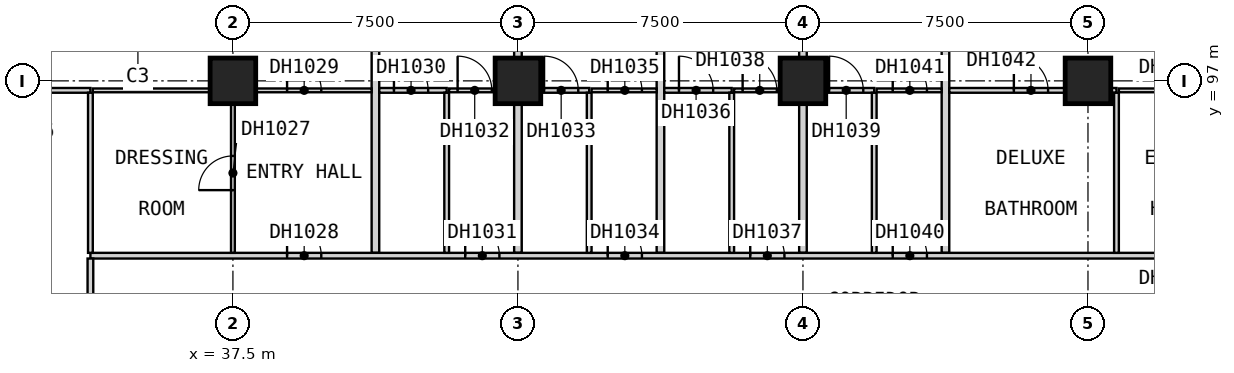
"""IFC4 building model, lengths in metres.
Left out: names, types, materials, properties, quantities, classifications, styles, units other than length and angle.
Written with IfcOpenShell. Run it as: python <this file> out.ifc"""

import sys

from ifc_helpers import new_model, si_unit, direction, frame, frame_2d, origin, origin_2d, place, context, subcontext, project, spatial, rectangle, extrude, element, fill, save


model = new_model("IFC4")
c1 = context("Model", 3, precision=1e-05, world=origin(), true_north=direction((0.0, 1.0)))
c2 = subcontext(c1, "Body", "Model", "MODEL_VIEW")
j1 = project(units=[si_unit("LENGTHUNIT", "METRE"), si_unit("PLANEANGLEUNIT", "RADIAN")], contexts=[c1])
p1 = place(None, origin())
s1 = spatial("IfcSite", under=j1, at=p1, CompositionType="ELEMENT")
p2 = place(p1, origin())
s2 = spatial("IfcBuilding", under=s1, at=p2, CompositionType="ELEMENT")
p3 = place(p2, frame((0.0, 0.0, 48.4)))
s3 = spatial("IfcBuildingStorey", under=s2, at=p3, CompositionType="ELEMENT", Elevation=48.4)
for number, where, z_axis, x_axis in (
    (1, (37.5, 97.0, 0.0), (0.0, 0.0, 1.0), (1.0, 0.0, 0.0)),
    (2, (45.0, 97.0, 0.0), (0.0, 0.0, 1.0), (1.0, 0.0, 0.0)),
    (3, (52.5, 97.0, 0.0), (0.0, 0.0, 1.0), (1.0, 0.0, 0.0)),
    (4, (60.0, 97.0, 0.0), (0.0, 0.0, 1.0), (1.0, 0.0, 0.0)),
):
    element("IfcColumn", number, at=place(p3, frame(where, z_axis=z_axis, x_axis=x_axis)), inside=s3, PredefinedType="COLUMN", context=c2, shape_type="SweptSolid", body=[
        extrude(rectangle(XDim=1.2, YDim=1.2, at=origin_2d()), origin(), (0.0, 0.0, 1.0), 3.6),
    ])
p4 = place(p3, frame((41.25, 92.475, 0.0), z_axis=(0.0, 0.0, 1.0), x_axis=(0.0, 1.0, 0.0)))
e5 = element("IfcWall", 5, at=p4, inside=s3, PredefinedType="PARTITIONING", context=c2, shape_type="SweptSolid", body=[
    extrude(rectangle(XDim=11.715, YDim=0.2, at=frame_2d((5.857, 0.0))), origin(), (0.0, 0.0, 1.0), 3.35),
])
p5 = place(p3, frame((45.0, 92.475, 0.0), z_axis=(0.0, 0.0, 1.0), x_axis=(0.0, 1.0, 0.0)))
e6 = element("IfcWall", 6, at=p5, inside=s3, PredefinedType="PARTITIONING", context=c2, shape_type="SweptSolid", body=[
    extrude(rectangle(XDim=12.525, YDim=0.2, at=frame_2d((6.262, 0.0))), origin(), (0.0, 0.0, 1.0), 3.35),
])
p6 = place(p3, frame((48.75, 92.475, 0.0), z_axis=(0.0, 0.0, 1.0), x_axis=(0.0, 1.0, 0.0)))
e7 = element("IfcWall", 7, at=p6, inside=s3, PredefinedType="PARTITIONING", context=c2, shape_type="SweptSolid", body=[
    extrude(rectangle(XDim=11.715, YDim=0.2, at=frame_2d((5.857, 0.0))), origin(), (0.0, 0.0, 1.0), 3.35),
])
p7 = place(p3, frame((52.5, 92.475, 0.0), z_axis=(0.0, 0.0, 1.0), x_axis=(0.0, 1.0, 0.0)))
e8 = element("IfcWall", 8, at=p7, inside=s3, PredefinedType="PARTITIONING", context=c2, shape_type="SweptSolid", body=[
    extrude(rectangle(XDim=12.525, YDim=0.2, at=frame_2d((6.262, 0.0))), origin(), (0.0, 0.0, 1.0), 3.35),
])
p8 = place(p3, frame((56.25, 92.475, 0.0), z_axis=(0.0, 0.0, 1.0), x_axis=(0.0, 1.0, 0.0)))
e9 = element("IfcWall", 9, at=p8, inside=s3, PredefinedType="PARTITIONING", context=c2, shape_type="SweptSolid", body=[
    extrude(rectangle(XDim=11.715, YDim=0.2, at=frame_2d((5.857, 0.0))), origin(), (0.0, 0.0, 1.0), 3.35),
])
p9 = place(p3, frame((33.75, 92.4, 0.0), z_axis=(0.0, 0.0, 1.0), x_axis=(1.0, 0.0, 0.0)))
e10 = element("IfcWall", 10, at=p9, inside=s3, PredefinedType="PARTITIONING", context=c2, shape_type="SweptSolid", body=[
    extrude(rectangle(XDim=43.65, YDim=0.15, at=frame_2d((21.825, 0.0))), origin(), (0.0, 0.0, 1.0), 3.35),
])
p10 = place(p9, frame((5.175, 0.0, 0.0)))
e11 = element("IfcOpeningElement", 11, at=p10, cuts=e10, PredefinedType="OPENING", context=c2, shape_type="SweptSolid", body=[
    extrude(rectangle(XDim=0.9, YDim=2.1, at=frame_2d((0.45, 1.05))), frame((0.0, 0.085, 0.0), z_axis=(0.0, -1.0, 0.0), x_axis=(1.0, 0.0, 0.0)), (0.0, 0.0, 1.0), 0.17),
])
p11 = place(p9, frame((9.863, 0.0, 0.0)))
e12 = element("IfcOpeningElement", 12, at=p11, cuts=e10, PredefinedType="OPENING", context=c2, shape_type="SweptSolid", body=[
    extrude(rectangle(XDim=0.9, YDim=2.1, at=frame_2d((0.45, 1.05))), frame((0.0, 0.085, 0.0), z_axis=(0.0, -1.0, 0.0), x_axis=(1.0, 0.0, 0.0)), (0.0, 0.0, 1.0), 0.17),
])
p12 = place(p9, frame((13.613, 0.0, 0.0)))
e13 = element("IfcOpeningElement", 13, at=p12, cuts=e10, PredefinedType="OPENING", context=c2, shape_type="SweptSolid", body=[
    extrude(rectangle(XDim=0.9, YDim=2.1, at=frame_2d((0.45, 1.05))), frame((0.0, 0.085, 0.0), z_axis=(0.0, -1.0, 0.0), x_axis=(1.0, 0.0, 0.0)), (0.0, 0.0, 1.0), 0.17),
])
p13 = place(p9, frame((17.363, 0.0, 0.0)))
e14 = element("IfcOpeningElement", 14, at=p13, cuts=e10, PredefinedType="OPENING", context=c2, shape_type="SweptSolid", body=[
    extrude(rectangle(XDim=0.9, YDim=2.1, at=frame_2d((0.45, 1.05))), frame((0.0, 0.085, 0.0), z_axis=(0.0, -1.0, 0.0), x_axis=(1.0, 0.0, 0.0)), (0.0, 0.0, 1.0), 0.17),
])
p14 = place(p9, frame((21.113, 0.0, 0.0)))
e15 = element("IfcOpeningElement", 15, at=p14, cuts=e10, PredefinedType="OPENING", context=c2, shape_type="SweptSolid", body=[
    extrude(rectangle(XDim=0.9, YDim=2.1, at=frame_2d((0.45, 1.05))), frame((0.0, 0.085, 0.0), z_axis=(0.0, -1.0, 0.0), x_axis=(1.0, 0.0, 0.0)), (0.0, 0.0, 1.0), 0.17),
])
p15 = place(p9, frame((28.05, 0.0, 0.0)))
e16 = element("IfcOpeningElement", 16, at=p15, cuts=e10, PredefinedType="OPENING", context=c2, shape_type="SweptSolid", body=[
    extrude(rectangle(XDim=0.9, YDim=2.1, at=frame_2d((0.45, 1.05))), frame((0.0, 0.085, 0.0), z_axis=(0.0, -1.0, 0.0), x_axis=(1.0, 0.0, 0.0)), (0.0, 0.0, 1.0), 0.17),
])
p16 = place(p9, frame((32.363, 0.0, 0.0)))
e17 = element("IfcOpeningElement", 17, at=p16, cuts=e10, PredefinedType="OPENING", context=c2, shape_type="SweptSolid", body=[
    extrude(rectangle(XDim=0.9, YDim=2.1, at=frame_2d((0.45, 1.05))), frame((0.0, 0.085, 0.0), z_axis=(0.0, -1.0, 0.0), x_axis=(1.0, 0.0, 0.0)), (0.0, 0.0, 1.0), 0.17),
])
p17 = place(p9, frame((39.3, 0.0, 0.0)))
e18 = element("IfcOpeningElement", 18, at=p17, cuts=e10, PredefinedType="OPENING", context=c2, shape_type="SweptSolid", body=[
    extrude(rectangle(XDim=0.9, YDim=2.1, at=frame_2d((0.45, 1.05))), frame((0.0, 0.085, 0.0), z_axis=(0.0, -1.0, 0.0), x_axis=(1.0, 0.0, 0.0)), (0.0, 0.0, 1.0), 0.17),
])
p18 = place(p9, frame((42.0, 0.0, 0.0)))
e19 = element("IfcOpeningElement", 19, at=p18, cuts=e10, PredefinedType="OPENING", context=c2, shape_type="SweptSolid", body=[
    extrude(rectangle(XDim=0.9, YDim=2.1, at=frame_2d((0.45, 1.05))), frame((0.0, 0.085, 0.0), z_axis=(0.0, -1.0, 0.0), x_axis=(1.0, 0.0, 0.0)), (0.0, 0.0, 1.0), 0.17),
])
p19 = place(p3, frame((33.75, 90.1, 0.0), z_axis=(0.0, 0.0, 1.0), x_axis=(0.0, 1.0, 0.0)))
e20 = element("IfcWall", 20, at=p19, inside=s3, PredefinedType="PARTITIONING", context=c2, shape_type="SweptSolid", body=[
    extrude(rectangle(XDim=2.225, YDim=0.15, at=frame_2d((1.112, 0.0))), origin(), (0.0, 0.0, 1.0), 3.35),
])
p20 = place(p3, frame((33.812, 96.75, 0.0), z_axis=(0.0, 0.0, 1.0), x_axis=(1.0, 0.0, 0.0)))
e21 = element("IfcWall", 21, at=p20, inside=s3, PredefinedType="PARTITIONING", context=c2, shape_type="SweptSolid", body=[
    extrude(rectangle(XDim=7.337, YDim=0.1, at=frame_2d((3.669, 0.0))), origin(), (0.0, 0.0, 1.0), 3.35),
])
p21 = place(p20, frame((5.113, 0.0, 0.0)))
e22 = element("IfcOpeningElement", 22, at=p21, cuts=e21, PredefinedType="OPENING", context=c2, shape_type="SweptSolid", body=[
    extrude(rectangle(XDim=0.9, YDim=2.1, at=frame_2d((0.45, 1.05))), frame((0.0, 0.06, 0.0), z_axis=(0.0, -1.0, 0.0), x_axis=(1.0, 0.0, 0.0)), (0.0, 0.0, 1.0), 0.12),
])
p22 = place(p3, frame((43.188, 96.75, 0.0), z_axis=(0.0, 0.0, 1.0), x_axis=(1.0, 0.0, 0.0)))
e23 = element("IfcWall", 23, at=p22, inside=s3, PredefinedType="PARTITIONING", context=c2, shape_type="SweptSolid", body=[
    extrude(rectangle(XDim=1.712, YDim=0.1, at=frame_2d((0.856, 0.0))), origin(), (0.0, 0.0, 1.0), 3.35),
])
p23 = place(p22, frame((0.225, 0.0, 0.0)))
e24 = element("IfcOpeningElement", 24, at=p23, cuts=e23, PredefinedType="OPENING", context=c2, shape_type="SweptSolid", body=[
    extrude(rectangle(XDim=0.9, YDim=2.1, at=frame_2d((0.45, 1.05))), frame((0.0, 0.06, 0.0), z_axis=(0.0, -1.0, 0.0), x_axis=(1.0, 0.0, 0.0)), (0.0, 0.0, 1.0), 0.12),
])
p24 = place(p3, frame((46.938, 96.75, 0.0), z_axis=(0.0, 0.0, 1.0), x_axis=(1.0, 0.0, 0.0)))
e25 = element("IfcWall", 25, at=p24, inside=s3, PredefinedType="PARTITIONING", context=c2, shape_type="SweptSolid", body=[
    extrude(rectangle(XDim=1.712, YDim=0.1, at=frame_2d((0.856, 0.0))), origin(), (0.0, 0.0, 1.0), 3.35),
])
p25 = place(p24, frame((0.425, 0.0, 0.0)))
e26 = element("IfcOpeningElement", 26, at=p25, cuts=e25, PredefinedType="OPENING", context=c2, shape_type="SweptSolid", body=[
    extrude(rectangle(XDim=0.9, YDim=2.1, at=frame_2d((0.45, 1.05))), frame((0.0, 0.06, 0.0), z_axis=(0.0, -1.0, 0.0), x_axis=(1.0, 0.0, 0.0)), (0.0, 0.0, 1.0), 0.12),
])
p26 = place(p3, frame((50.688, 96.75, 0.0), z_axis=(0.0, 0.0, 1.0), x_axis=(1.0, 0.0, 0.0)))
e27 = element("IfcWall", 27, at=p26, inside=s3, PredefinedType="PARTITIONING", context=c2, shape_type="SweptSolid", body=[
    extrude(rectangle(XDim=1.712, YDim=0.1, at=frame_2d((0.856, 0.0))), origin(), (0.0, 0.0, 1.0), 3.35),
])
p27 = place(p26, frame((0.225, 0.0, 0.0)))
e28 = element("IfcOpeningElement", 28, at=p27, cuts=e27, PredefinedType="OPENING", context=c2, shape_type="SweptSolid", body=[
    extrude(rectangle(XDim=0.9, YDim=2.1, at=frame_2d((0.45, 1.05))), frame((0.0, 0.06, 0.0), z_axis=(0.0, -1.0, 0.0), x_axis=(1.0, 0.0, 0.0)), (0.0, 0.0, 1.0), 0.12),
])
p28 = place(p3, frame((54.438, 96.75, 0.0), z_axis=(0.0, 0.0, 1.0), x_axis=(1.0, 0.0, 0.0)))
e29 = element("IfcWall", 29, at=p28, inside=s3, PredefinedType="PARTITIONING", context=c2, shape_type="SweptSolid", body=[
    extrude(rectangle(XDim=1.712, YDim=0.1, at=frame_2d((0.856, 0.0))), origin(), (0.0, 0.0, 1.0), 3.35),
])
p29 = place(p28, frame((0.425, 0.0, 0.0)))
e30 = element("IfcOpeningElement", 30, at=p29, cuts=e29, PredefinedType="OPENING", context=c2, shape_type="SweptSolid", body=[
    extrude(rectangle(XDim=0.9, YDim=2.1, at=frame_2d((0.45, 1.05))), frame((0.0, 0.06, 0.0), z_axis=(0.0, -1.0, 0.0), x_axis=(1.0, 0.0, 0.0)), (0.0, 0.0, 1.0), 0.12),
])
p30 = place(p3, frame((60.812, 96.75, 0.0), z_axis=(0.0, 0.0, 1.0), x_axis=(1.0, 0.0, 0.0)))
e31 = element("IfcWall", 31, at=p30, inside=s3, PredefinedType="PARTITIONING", context=c2, shape_type="SweptSolid", body=[
    extrude(rectangle(XDim=2.837, YDim=0.1, at=frame_2d((1.419, 0.0))), origin(), (0.0, 0.0, 1.0), 3.35),
])
p31 = place(p30, frame((0.988, 0.0, 0.0)))
e32 = element("IfcOpeningElement", 32, at=p31, cuts=e31, PredefinedType="OPENING", context=c2, shape_type="SweptSolid", body=[
    extrude(rectangle(XDim=0.9, YDim=2.1, at=frame_2d((0.45, 1.05))), frame((0.0, 0.06, 0.0), z_axis=(0.0, -1.0, 0.0), x_axis=(1.0, 0.0, 0.0)), (0.0, 0.0, 1.0), 0.12),
])
p32 = place(p3, frame((37.5, 92.475, 0.0), z_axis=(0.0, 0.0, 1.0), x_axis=(0.0, 1.0, 0.0)))
e33 = element("IfcWall", 33, at=p32, inside=s3, PredefinedType="PARTITIONING", context=c2, shape_type="SweptSolid", body=[
    extrude(rectangle(XDim=4.225, YDim=0.1, at=frame_2d((2.112, 0.0))), origin(), (0.0, 0.0, 1.0), 3.35),
])
p33 = place(p32, frame((1.65, 0.0, 0.0)))
e34 = element("IfcOpeningElement", 34, at=p33, cuts=e33, PredefinedType="OPENING", context=c2, shape_type="SweptSolid", body=[
    extrude(rectangle(XDim=0.9, YDim=2.1, at=frame_2d((0.45, 1.05))), frame((0.0, 0.06, 0.0), z_axis=(0.0, -1.0, 0.0), x_axis=(1.0, 0.0, 0.0)), (0.0, 0.0, 1.0), 0.12),
])
p34 = place(p3, frame((30.0, 96.75, 0.0), z_axis=(0.0, 0.0, 1.0), x_axis=(1.0, 0.0, 0.0)))
e35 = element("IfcWall", 35, at=p34, inside=s3, PredefinedType="PARTITIONING", context=c2, shape_type="SweptSolid", body=[
    extrude(rectangle(XDim=3.75, YDim=0.125, at=frame_2d((1.875, 0.0))), origin(), (0.0, 0.0, 1.0), 3.35),
])
p35 = place(p34, frame((1.425, 0.0, 0.0)))
e36 = element("IfcOpeningElement", 36, at=p35, cuts=e35, PredefinedType="OPENING", context=c2, shape_type="SweptSolid", body=[
    extrude(rectangle(XDim=0.9, YDim=2.1, at=frame_2d((0.45, 1.05))), frame((0.0, 0.073, 0.0), z_axis=(0.0, -1.0, 0.0), x_axis=(1.0, 0.0, 0.0)), (0.0, 0.0, 1.0), 0.145),
])
p36 = place(p3, frame((41.35, 96.75, 0.0), z_axis=(0.0, 0.0, 1.0), x_axis=(1.0, 0.0, 0.0)))
e37 = element("IfcWall", 37, at=p36, inside=s3, PredefinedType="PARTITIONING", context=c2, shape_type="SweptSolid", body=[
    extrude(rectangle(XDim=1.775, YDim=0.125, at=frame_2d((0.887, 0.0))), origin(), (0.0, 0.0, 1.0), 3.35),
])
p37 = place(p36, frame((0.387, 0.0, 0.0)))
e38 = element("IfcOpeningElement", 38, at=p37, cuts=e37, PredefinedType="OPENING", context=c2, shape_type="SweptSolid", body=[
    extrude(rectangle(XDim=0.9, YDim=2.1, at=frame_2d((0.45, 1.05))), frame((0.0, 0.073, 0.0), z_axis=(0.0, -1.0, 0.0), x_axis=(1.0, 0.0, 0.0)), (0.0, 0.0, 1.0), 0.145),
])
p38 = place(p3, frame((45.1, 96.75, 0.0), z_axis=(0.0, 0.0, 1.0), x_axis=(1.0, 0.0, 0.0)))
e39 = element("IfcWall", 39, at=p38, inside=s3, PredefinedType="PARTITIONING", context=c2, shape_type="SweptSolid", body=[
    extrude(rectangle(XDim=1.775, YDim=0.125, at=frame_2d((0.887, 0.0))), origin(), (0.0, 0.0, 1.0), 3.35),
])
p39 = place(p38, frame((0.587, 0.0, 0.0)))
e40 = element("IfcOpeningElement", 40, at=p39, cuts=e39, PredefinedType="OPENING", context=c2, shape_type="SweptSolid", body=[
    extrude(rectangle(XDim=0.9, YDim=2.1, at=frame_2d((0.45, 1.05))), frame((0.0, 0.073, 0.0), z_axis=(0.0, -1.0, 0.0), x_axis=(1.0, 0.0, 0.0)), (0.0, 0.0, 1.0), 0.145),
])
p40 = place(p3, frame((48.85, 96.75, 0.0), z_axis=(0.0, 0.0, 1.0), x_axis=(1.0, 0.0, 0.0)))
e41 = element("IfcWall", 41, at=p40, inside=s3, PredefinedType="PARTITIONING", context=c2, shape_type="SweptSolid", body=[
    extrude(rectangle(XDim=1.775, YDim=0.125, at=frame_2d((0.887, 0.0))), origin(), (0.0, 0.0, 1.0), 3.35),
])
p41 = place(p40, frame((0.387, 0.0, 0.0)))
e42 = element("IfcOpeningElement", 42, at=p41, cuts=e41, PredefinedType="OPENING", context=c2, shape_type="SweptSolid", body=[
    extrude(rectangle(XDim=0.9, YDim=2.1, at=frame_2d((0.45, 1.05))), frame((0.0, 0.073, 0.0), z_axis=(0.0, -1.0, 0.0), x_axis=(1.0, 0.0, 0.0)), (0.0, 0.0, 1.0), 0.145),
])
p42 = place(p3, frame((52.6, 96.75, 0.0), z_axis=(0.0, 0.0, 1.0), x_axis=(1.0, 0.0, 0.0)))
e43 = element("IfcWall", 43, at=p42, inside=s3, PredefinedType="PARTITIONING", context=c2, shape_type="SweptSolid", body=[
    extrude(rectangle(XDim=1.775, YDim=0.125, at=frame_2d((0.887, 0.0))), origin(), (0.0, 0.0, 1.0), 3.35),
])
p43 = place(p42, frame((0.587, 0.0, 0.0)))
e44 = element("IfcOpeningElement", 44, at=p43, cuts=e43, PredefinedType="OPENING", context=c2, shape_type="SweptSolid", body=[
    extrude(rectangle(XDim=0.9, YDim=2.1, at=frame_2d((0.45, 1.05))), frame((0.0, 0.073, 0.0), z_axis=(0.0, -1.0, 0.0), x_axis=(1.0, 0.0, 0.0)), (0.0, 0.0, 1.0), 0.145),
])
p44 = place(p3, frame((56.35, 96.75, 0.0), z_axis=(0.0, 0.0, 1.0), x_axis=(1.0, 0.0, 0.0)))
e45 = element("IfcWall", 45, at=p44, inside=s3, PredefinedType="PARTITIONING", context=c2, shape_type="SweptSolid", body=[
    extrude(rectangle(XDim=4.4, YDim=0.125, at=frame_2d((2.2, 0.0))), origin(), (0.0, 0.0, 1.0), 3.35),
])
p45 = place(p44, frame((1.7, 0.0, 0.0)))
e46 = element("IfcOpeningElement", 46, at=p45, cuts=e45, PredefinedType="OPENING", context=c2, shape_type="SweptSolid", body=[
    extrude(rectangle(XDim=0.9, YDim=2.1, at=frame_2d((0.45, 1.05))), frame((0.0, 0.073, 0.0), z_axis=(0.0, -1.0, 0.0), x_axis=(1.0, 0.0, 0.0)), (0.0, 0.0, 1.0), 0.145),
])
for number, where, z_axis, x_axis in (
    (47, (33.75, 92.475, 0.0), (0.0, 0.0, 1.0), (0.0, 1.0, 0.0)),
    (48, (43.125, 92.475, 0.0), (0.0, 0.0, 1.0), (0.0, 1.0, 0.0)),
    (49, (46.875, 92.475, 0.0), (0.0, 0.0, 1.0), (0.0, 1.0, 0.0)),
    (50, (50.625, 92.475, 0.0), (0.0, 0.0, 1.0), (0.0, 1.0, 0.0)),
    (51, (54.375, 92.475, 0.0), (0.0, 0.0, 1.0), (0.0, 1.0, 0.0)),
    (52, (60.75, 92.475, 0.0), (0.0, 0.0, 1.0), (0.0, 1.0, 0.0)),
):
    element("IfcWall", number, at=place(p3, frame(where, z_axis=z_axis, x_axis=x_axis)), inside=s3, PredefinedType="PARTITIONING", context=c2, shape_type="SweptSolid", body=[
        extrude(rectangle(XDim=4.212, YDim=0.125, at=frame_2d((2.106, 0.0))), origin(), (0.0, 0.0, 1.0), 3.35),
    ])
p46 = place(p33, origin())
e53 = element("IfcDoor", 53, at=p46, inside=s3, OperationType="SINGLE_SWING_RIGHT", PredefinedType="DOOR", context=c2, shape_type="SweptSolid", body=[
    extrude(rectangle(XDim=0.9, YDim=2.1, at=frame_2d((0.45, 1.05))), frame((0.0, 0.025, 0.0), z_axis=(0.0, -1.0, 0.0), x_axis=(1.0, 0.0, 0.0)), (0.0, 0.0, 1.0), 0.05),
])
fill(e34, e53)
p47 = place(p10, origin())
e54 = element("IfcDoor", 54, at=p47, inside=s3, OperationType="SINGLE_SWING_LEFT", PredefinedType="DOOR", context=c2, shape_type="SweptSolid", body=[
    extrude(rectangle(XDim=0.9, YDim=2.1, at=frame_2d((0.45, 1.05))), frame((0.0, 0.025, 0.0), z_axis=(0.0, -1.0, 0.0), x_axis=(1.0, 0.0, 0.0)), (0.0, 0.0, 1.0), 0.05),
])
fill(e11, e54)
p48 = place(p21, origin())
e55 = element("IfcDoor", 55, at=p48, inside=s3, OperationType="SINGLE_SWING_RIGHT", PredefinedType="DOOR", context=c2, shape_type="SweptSolid", body=[
    extrude(rectangle(XDim=0.9, YDim=2.1, at=frame_2d((0.45, 1.05))), frame((0.0, 0.025, 0.0), z_axis=(0.0, -1.0, 0.0), x_axis=(1.0, 0.0, 0.0)), (0.0, 0.0, 1.0), 0.05),
])
fill(e22, e55)
p49 = place(p37, origin())
e56 = element("IfcDoor", 56, at=p49, inside=s3, OperationType="SINGLE_SWING_RIGHT", PredefinedType="DOOR", context=c2, shape_type="SweptSolid", body=[
    extrude(rectangle(XDim=0.9, YDim=2.1, at=frame_2d((0.45, 1.05))), frame((0.0, 0.025, 0.0), z_axis=(0.0, -1.0, 0.0), x_axis=(1.0, 0.0, 0.0)), (0.0, 0.0, 1.0), 0.05),
])
fill(e38, e56)
p50 = place(p11, origin())
e57 = element("IfcDoor", 57, at=p50, inside=s3, OperationType="SINGLE_SWING_LEFT", PredefinedType="DOOR", context=c2, shape_type="SweptSolid", body=[
    extrude(rectangle(XDim=0.9, YDim=2.1, at=frame_2d((0.45, 1.05))), frame((0.0, 0.025, 0.0), z_axis=(0.0, -1.0, 0.0), x_axis=(1.0, 0.0, 0.0)), (0.0, 0.0, 1.0), 0.05),
])
fill(e12, e57)
p51 = place(p23, origin())
e58 = element("IfcDoor", 58, at=p51, inside=s3, OperationType="SINGLE_SWING_RIGHT", PredefinedType="DOOR", context=c2, shape_type="SweptSolid", body=[
    extrude(rectangle(XDim=0.9, YDim=2.1, at=frame_2d((0.45, 1.05))), frame((0.0, 0.025, 0.0), z_axis=(0.0, -1.0, 0.0), x_axis=(1.0, 0.0, 0.0)), (0.0, 0.0, 1.0), 0.05),
])
fill(e24, e58)
p52 = place(p39, origin())
e59 = element("IfcDoor", 59, at=p52, inside=s3, OperationType="SINGLE_SWING_LEFT", PredefinedType="DOOR", context=c2, shape_type="SweptSolid", body=[
    extrude(rectangle(XDim=0.9, YDim=2.1, at=frame_2d((0.45, 1.05))), frame((0.0, 0.025, 0.0), z_axis=(0.0, -1.0, 0.0), x_axis=(1.0, 0.0, 0.0)), (0.0, 0.0, 1.0), 0.05),
])
fill(e40, e59)
p53 = place(p12, origin())
e60 = element("IfcDoor", 60, at=p53, inside=s3, OperationType="SINGLE_SWING_LEFT", PredefinedType="DOOR", context=c2, shape_type="SweptSolid", body=[
    extrude(rectangle(XDim=0.9, YDim=2.1, at=frame_2d((0.45, 1.05))), frame((0.0, 0.025, 0.0), z_axis=(0.0, -1.0, 0.0), x_axis=(1.0, 0.0, 0.0)), (0.0, 0.0, 1.0), 0.05),
])
fill(e13, e60)
p54 = place(p25, origin())
e61 = element("IfcDoor", 61, at=p54, inside=s3, OperationType="SINGLE_SWING_RIGHT", PredefinedType="DOOR", context=c2, shape_type="SweptSolid", body=[
    extrude(rectangle(XDim=0.9, YDim=2.1, at=frame_2d((0.45, 1.05))), frame((0.0, 0.025, 0.0), z_axis=(0.0, -1.0, 0.0), x_axis=(1.0, 0.0, 0.0)), (0.0, 0.0, 1.0), 0.05),
])
fill(e26, e61)
p55 = place(p41, origin())
e62 = element("IfcDoor", 62, at=p55, inside=s3, OperationType="SINGLE_SWING_RIGHT", PredefinedType="DOOR", context=c2, shape_type="SweptSolid", body=[
    extrude(rectangle(XDim=0.9, YDim=2.1, at=frame_2d((0.45, 1.05))), frame((0.0, 0.025, 0.0), z_axis=(0.0, -1.0, 0.0), x_axis=(1.0, 0.0, 0.0)), (0.0, 0.0, 1.0), 0.05),
])
fill(e42, e62)
p56 = place(p13, origin())
e63 = element("IfcDoor", 63, at=p56, inside=s3, OperationType="SINGLE_SWING_LEFT", PredefinedType="DOOR", context=c2, shape_type="SweptSolid", body=[
    extrude(rectangle(XDim=0.9, YDim=2.1, at=frame_2d((0.45, 1.05))), frame((0.0, 0.025, 0.0), z_axis=(0.0, -1.0, 0.0), x_axis=(1.0, 0.0, 0.0)), (0.0, 0.0, 1.0), 0.05),
])
fill(e14, e63)
p57 = place(p27, origin())
e64 = element("IfcDoor", 64, at=p57, inside=s3, OperationType="SINGLE_SWING_RIGHT", PredefinedType="DOOR", context=c2, shape_type="SweptSolid", body=[
    extrude(rectangle(XDim=0.9, YDim=2.1, at=frame_2d((0.45, 1.05))), frame((0.0, 0.025, 0.0), z_axis=(0.0, -1.0, 0.0), x_axis=(1.0, 0.0, 0.0)), (0.0, 0.0, 1.0), 0.05),
])
fill(e28, e64)
p58 = place(p43, origin())
e65 = element("IfcDoor", 65, at=p58, inside=s3, OperationType="SINGLE_SWING_LEFT", PredefinedType="DOOR", context=c2, shape_type="SweptSolid", body=[
    extrude(rectangle(XDim=0.9, YDim=2.1, at=frame_2d((0.45, 1.05))), frame((0.0, 0.025, 0.0), z_axis=(0.0, -1.0, 0.0), x_axis=(1.0, 0.0, 0.0)), (0.0, 0.0, 1.0), 0.05),
])
fill(e44, e65)
p59 = place(p14, origin())
e66 = element("IfcDoor", 66, at=p59, inside=s3, OperationType="SINGLE_SWING_LEFT", PredefinedType="DOOR", context=c2, shape_type="SweptSolid", body=[
    extrude(rectangle(XDim=0.9, YDim=2.1, at=frame_2d((0.45, 1.05))), frame((0.0, 0.025, 0.0), z_axis=(0.0, -1.0, 0.0), x_axis=(1.0, 0.0, 0.0)), (0.0, 0.0, 1.0), 0.05),
])
fill(e15, e66)
p60 = place(p29, origin())
e67 = element("IfcDoor", 67, at=p60, inside=s3, OperationType="SINGLE_SWING_RIGHT", PredefinedType="DOOR", context=c2, shape_type="SweptSolid", body=[
    extrude(rectangle(XDim=0.9, YDim=2.1, at=frame_2d((0.45, 1.05))), frame((0.0, 0.025, 0.0), z_axis=(0.0, -1.0, 0.0), x_axis=(1.0, 0.0, 0.0)), (0.0, 0.0, 1.0), 0.05),
])
fill(e30, e67)
p61 = place(p45, origin())
e68 = element("IfcDoor", 68, at=p61, inside=s3, OperationType="SINGLE_SWING_RIGHT", PredefinedType="DOOR", context=c2, shape_type="SweptSolid", body=[
    extrude(rectangle(XDim=0.9, YDim=2.1, at=frame_2d((0.45, 1.05))), frame((0.0, 0.025, 0.0), z_axis=(0.0, -1.0, 0.0), x_axis=(1.0, 0.0, 0.0)), (0.0, 0.0, 1.0), 0.05),
])
fill(e46, e68)
save(model, sys.argv[1])
